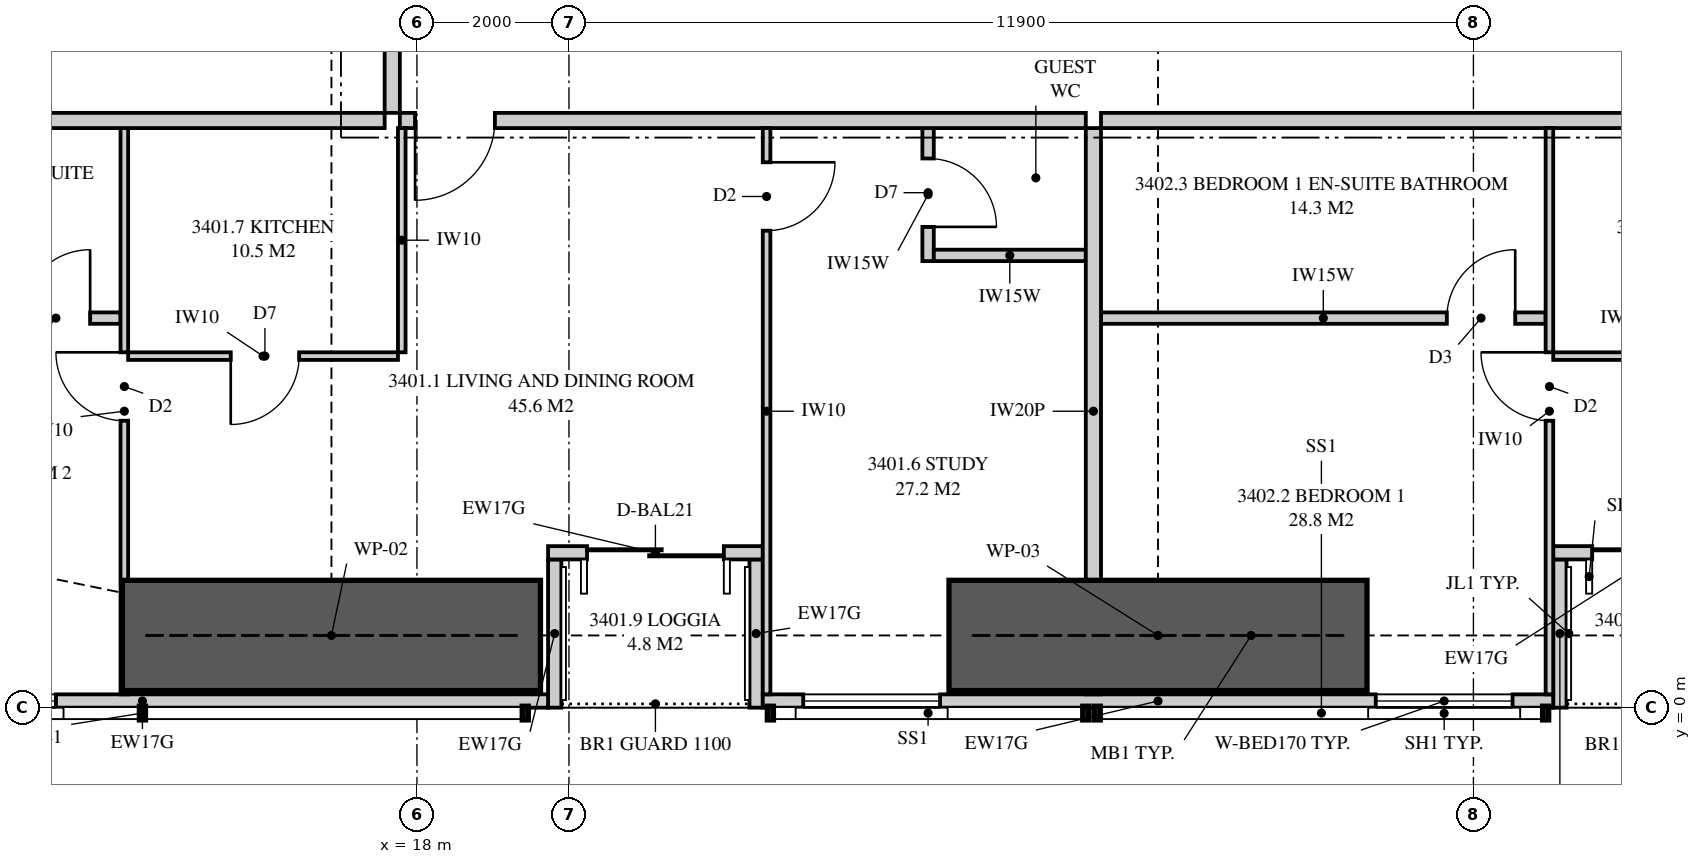
"""IFC4 building model, lengths in metres.
Left out: names, types, materials, properties, quantities, classifications, styles, units other than length and angle.
Written with IfcOpenShell. Run it as: python <this file> out.ifc"""

import sys

from ifc_helpers import new_model, si_unit, direction, frame, frame_2d, origin, place, context, subcontext, project, spatial, polyline, rectangle, outline, extrude, element, fill, save


model = new_model("IFC4")
c1 = context("Model", 3, precision=1e-05, world=origin(), true_north=direction((0.0, 1.0)))
c2 = subcontext(c1, "Body", "Model", "MODEL_VIEW")
j1 = project(units=[si_unit("LENGTHUNIT", "METRE"), si_unit("PLANEANGLEUNIT", "RADIAN")], contexts=[c1])
p1 = place(None, origin())
s1 = spatial("IfcSite", under=j1, at=p1, CompositionType="ELEMENT")
p2 = place(p1, origin())
s2 = spatial("IfcBuilding", under=s1, at=p2, CompositionType="ELEMENT")
p3 = place(p2, frame((0.0, 0.0, 124.95)))
s3 = spatial("IfcBuildingStorey", under=s2, at=p3, CompositionType="ELEMENT", Elevation=124.95)
p4 = place(p3, frame((9.051, 0.087, 0.0), z_axis=(0.0, 0.0, 1.0), x_axis=(1.0, 0.0, 0.0)))
e1 = element("IfcWall", 1, at=p4, inside=s3, PredefinedType="SOLIDWALL", context=c2, shape_type="SweptSolid", body=[
    extrude(outline(polyline([(0.0, 0.0), (10.674, 0.0), (10.674, 2.15), (7.824, 2.15), (7.824, 3.11), (7.666, 3.11), (7.666, 2.15), (7.62, 2.15), (7.62, 3.11), (0.0, 3.11), (0.0, 0.0)])), frame((0.0, 0.087, 0.0), z_axis=(0.0, -1.0, 0.0), x_axis=(1.0, 0.0, 0.0)), (0.0, 0.0, 1.0), 0.175),
])
p5 = place(p4, frame((2.399, 0.0, 0.4)))
e2 = element("IfcOpeningElement", 2, at=p5, cuts=e1, PredefinedType="OPENING", context=c2, shape_type="SweptSolid", body=[
    extrude(rectangle(XDim=1.8, YDim=1.7, at=frame_2d((0.9, 0.85))), frame((0.0, 0.097, 0.0), z_axis=(0.0, -1.0, 0.0), x_axis=(1.0, 0.0, 0.0)), (0.0, 0.0, 1.0), 0.195),
])
p6 = place(p3, frame((22.55, 0.087, 0.0), z_axis=(0.0, 0.0, 1.0), x_axis=(1.0, 0.0, 0.0)))
e3 = element("IfcWall", 3, at=p6, inside=s3, PredefinedType="SOLIDWALL", context=c2, shape_type="SweptSolid", body=[
    extrude(rectangle(XDim=10.4, YDim=0.175, at=frame_2d((5.2, 0.0))), origin(), (0.0, 0.0, 1.0), 2.15),
])
p7 = place(p6, frame((0.532, 0.0, 0.4)))
e4 = element("IfcOpeningElement", 4, at=p7, cuts=e3, PredefinedType="OPENING", context=c2, shape_type="SweptSolid", body=[
    extrude(rectangle(XDim=1.8, YDim=1.7, at=frame_2d((0.9, 0.85))), frame((0.0, 0.097, 0.0), z_axis=(0.0, -1.0, 0.0), x_axis=(1.0, 0.0, 0.0)), (0.0, 0.0, 1.0), 0.195),
])
p8 = place(p6, frame((8.065, 0.0, 0.4)))
e5 = element("IfcOpeningElement", 5, at=p8, cuts=e3, PredefinedType="OPENING", context=c2, shape_type="SweptSolid", body=[
    extrude(rectangle(XDim=1.8, YDim=1.7, at=frame_2d((0.9, 0.85))), frame((0.0, 0.097, 0.0), z_axis=(0.0, -1.0, 0.0), x_axis=(1.0, 0.0, 0.0)), (0.0, 0.0, 1.0), 0.195),
])
p9 = place(p3, frame((19.725, 2.038, 0.0), z_axis=(0.0, 0.0, 1.0), x_axis=(1.0, 0.0, 0.0)))
e6 = element("IfcWall", 6, at=p9, inside=s3, PredefinedType="SOLIDWALL", context=c2, shape_type="SweptSolid", body=[
    extrude(rectangle(XDim=2.825, YDim=0.175, at=frame_2d((1.413, 0.0))), origin(), (0.0, 0.0, 1.0), 3.11),
])
p10 = place(p9, frame((0.512, 0.0, 0.0)))
e7 = element("IfcOpeningElement", 7, at=p10, cuts=e6, PredefinedType="OPENING", context=c2, shape_type="SweptSolid", body=[
    extrude(rectangle(XDim=1.8, YDim=2.1, at=frame_2d((0.9, 1.05))), frame((0.0, 0.097, 0.0), z_axis=(0.0, -1.0, 0.0), x_axis=(1.0, 0.0, 0.0)), (0.0, 0.0, 1.0), 0.195),
])
for number, where, z_axis, x_axis in (
    (8, (19.812, 0.0, 0.0), (0.0, 0.0, 1.0), (0.0, 1.0, 0.0)),
    (9, (22.462, 0.0, 0.0), (0.0, 0.0, 1.0), (0.0, 1.0, 0.0)),
):
    element("IfcWall", number, at=place(p3, frame(where, z_axis=z_axis, x_axis=x_axis)), inside=s3, PredefinedType="SOLIDWALL", context=c2, shape_type="SweptSolid", body=[
        extrude(outline(polyline([(0.0, 0.0), (1.95, 0.0), (1.95, 3.11), (1.75, 3.11), (1.75, 2.15), (0.15, 2.15), (0.15, 3.11), (0.0, 3.11), (0.0, 0.0)])), frame((0.0, 0.087, 0.0), z_axis=(0.0, -1.0, 0.0), x_axis=(1.0, 0.0, 0.0)), (0.0, 0.0, 1.0), 0.175),
    ])
p11 = place(p3, frame((32.95, 2.038, 0.0), z_axis=(0.0, 0.0, 1.0), x_axis=(1.0, 0.0, 0.0)))
e10 = element("IfcWall", 10, at=p11, inside=s3, PredefinedType="SOLIDWALL", context=c2, shape_type="SweptSolid", body=[
    extrude(rectangle(XDim=2.825, YDim=0.175, at=frame_2d((1.413, 0.0))), origin(), (0.0, 0.0, 1.0), 3.11),
])
p12 = place(p11, frame((0.512, 0.0, 0.0)))
e11 = element("IfcOpeningElement", 11, at=p12, cuts=e10, PredefinedType="OPENING", context=c2, shape_type="SweptSolid", body=[
    extrude(rectangle(XDim=1.8, YDim=2.1, at=frame_2d((0.9, 1.05))), frame((0.0, 0.097, 0.0), z_axis=(0.0, -1.0, 0.0), x_axis=(1.0, 0.0, 0.0)), (0.0, 0.0, 1.0), 0.195),
])
p13 = place(p3, frame((33.038, 0.0, 0.0), z_axis=(0.0, 0.0, 1.0), x_axis=(0.0, 1.0, 0.0)))
e12 = element("IfcWall", 12, at=p13, inside=s3, PredefinedType="SOLIDWALL", context=c2, shape_type="SweptSolid", body=[
    extrude(outline(polyline([(0.0, 0.0), (1.95, 0.0), (1.95, 3.11), (1.75, 3.11), (1.75, 2.15), (0.15, 2.15), (0.15, 3.11), (0.0, 3.11), (0.0, 0.0)])), frame((0.0, 0.087, 0.0), z_axis=(0.0, -1.0, 0.0), x_axis=(1.0, 0.0, 0.0)), (0.0, 0.0, 1.0), 0.175),
])
p14 = place(p3, frame((26.9, 0.175, 0.0), z_axis=(0.0, 0.0, 1.0), x_axis=(0.0, 1.0, 0.0)))
e13 = element("IfcWall", 13, at=p14, inside=s3, PredefinedType="PARTITIONING", context=c2, shape_type="SweptSolid", body=[
    extrude(outline(polyline([(0.529, 2.15), (0.0, 2.15), (0.0, 0.0), (0.529, 0.0), (0.529, 0.923), (1.021, 0.923), (1.021, 0.0), (7.45, 0.0), (7.45, 3.11), (1.685, 3.11), (1.685, 2.15), (1.021, 2.15), (1.021, 1.227), (0.529, 1.227), (0.529, 2.15)])), frame((0.0, 0.1, 0.0), z_axis=(0.0, -1.0, 0.0), x_axis=(1.0, 0.0, 0.0)), (0.0, 0.0, 1.0), 0.2),
])
p15 = place(p3, frame((17.775, 7.725, 0.0), z_axis=(0.0, 0.0, 1.0), x_axis=(1.0, 0.0, 0.0)))
e14 = element("IfcWall", 14, at=p15, inside=s3, PredefinedType="PARTITIONING", context=c2, shape_type="SweptSolid", body=[
    extrude(rectangle(XDim=9.025, YDim=0.2, at=frame_2d((4.513, 0.0))), origin(), (0.0, 0.0, 1.0), 3.11),
])
p16 = place(p15, frame((0.2, 0.0, 0.0)))
e15 = element("IfcOpeningElement", 15, at=p16, cuts=e14, PredefinedType="OPENING", context=c2, shape_type="SweptSolid", body=[
    extrude(rectangle(XDim=1.05, YDim=2.2, at=frame_2d((0.525, 1.1))), frame((0.0, 0.11, 0.0), z_axis=(0.0, -1.0, 0.0), x_axis=(1.0, 0.0, 0.0)), (0.0, 0.0, 1.0), 0.22),
])
p17 = place(p3, frame((14.15, 0.175, 0.0), z_axis=(0.0, 0.0, 1.0), x_axis=(0.0, 1.0, 0.0)))
e16 = element("IfcWall", 16, at=p17, inside=s3, PredefinedType="PARTITIONING", context=c2, shape_type="SweptSolid", body=[
    extrude(outline(polyline([(0.0, 0.0), (7.45, 0.0), (7.45, 3.11), (2.208, 3.11), (2.208, 2.15), (0.453, 2.15), (0.453, 3.11), (0.0, 3.11), (0.0, 0.0)])), frame((0.0, 0.05, 0.0), z_axis=(0.0, -1.0, 0.0), x_axis=(1.0, 0.0, 0.0)), (0.0, 0.0, 1.0), 0.1),
])
p18 = place(p17, frame((3.6, 0.0, 0.0)))
e17 = element("IfcOpeningElement", 17, at=p18, cuts=e16, PredefinedType="OPENING", context=c2, shape_type="SweptSolid", body=[
    extrude(rectangle(XDim=0.9, YDim=2.1, at=frame_2d((0.45, 1.05))), frame((0.0, 0.06, 0.0), z_axis=(0.0, -1.0, 0.0), x_axis=(1.0, 0.0, 0.0)), (0.0, 0.0, 1.0), 0.12),
])
p19 = place(p3, frame((10.6, 5.125, 0.0), z_axis=(0.0, 0.0, 1.0), x_axis=(1.0, 0.0, 0.0)))
e18 = element("IfcWall", 18, at=p19, inside=s3, PredefinedType="PLUMBINGWALL", context=c2, shape_type="SweptSolid", body=[
    extrude(outline(polyline([(0.0, 0.0), (3.5, 0.0), (3.5, 3.11), (0.885, 3.11), (0.885, 2.51), (0.0, 2.51), (0.0, 3.11), (0.0, 0.0)])), frame((0.0, 0.075, 0.0), z_axis=(0.0, -1.0, 0.0), x_axis=(1.0, 0.0, 0.0)), (0.0, 0.0, 1.0), 0.15),
])
p20 = place(p19, frame((2.2, 0.0, 0.0)))
e19 = element("IfcOpeningElement", 19, at=p20, cuts=e18, PredefinedType="OPENING", context=c2, shape_type="SweptSolid", body=[
    extrude(rectangle(XDim=0.9, YDim=2.1, at=frame_2d((0.45, 1.05))), frame((0.0, 0.085, 0.0), z_axis=(0.0, -1.0, 0.0), x_axis=(1.0, 0.0, 0.0)), (0.0, 0.0, 1.0), 0.17),
])
p21 = place(p3, frame((22.6, 0.175, 0.0), z_axis=(0.0, 0.0, 1.0), x_axis=(0.0, 1.0, 0.0)))
e20 = element("IfcWall", 20, at=p21, inside=s3, PredefinedType="PARTITIONING", context=c2, shape_type="SweptSolid", body=[
    extrude(outline(polyline([(0.0, 0.0), (7.45, 0.0), (7.45, 3.11), (1.635, 3.11), (1.635, 2.15), (0.0, 2.15), (0.0, 3.11), (0.0, 0.0)])), frame((0.0, 0.05, 0.0), z_axis=(0.0, -1.0, 0.0), x_axis=(1.0, 0.0, 0.0)), (0.0, 0.0, 1.0), 0.1),
])
p22 = place(p21, frame((6.1, 0.0, 0.0)))
e21 = element("IfcOpeningElement", 21, at=p22, cuts=e20, PredefinedType="OPENING", context=c2, shape_type="SweptSolid", body=[
    extrude(rectangle(XDim=0.9, YDim=2.1, at=frame_2d((0.45, 1.05))), frame((0.0, 0.06, 0.0), z_axis=(0.0, -1.0, 0.0), x_axis=(1.0, 0.0, 0.0)), (0.0, 0.0, 1.0), 0.12),
])
p23 = place(p3, frame((14.2, 4.625, 0.0), z_axis=(0.0, 0.0, 1.0), x_axis=(1.0, 0.0, 0.0)))
e22 = element("IfcWall", 22, at=p23, inside=s3, PredefinedType="PARTITIONING", context=c2, shape_type="SweptSolid", body=[
    extrude(outline(polyline([(0.0, 0.0), (3.55, 0.0), (3.55, 3.11), (2.962, 3.11), (2.962, 2.541), (2.388, 2.541), (2.388, 3.11), (0.0, 3.11), (0.0, 0.0)])), frame((0.0, 0.05, 0.0), z_axis=(0.0, -1.0, 0.0), x_axis=(1.0, 0.0, 0.0)), (0.0, 0.0, 1.0), 0.1),
])
p24 = place(p23, frame((1.35, 0.0, 0.0)))
e23 = element("IfcOpeningElement", 23, at=p24, cuts=e22, PredefinedType="OPENING", context=c2, shape_type="SweptSolid", body=[
    extrude(rectangle(XDim=0.9, YDim=2.1, at=frame_2d((0.45, 1.05))), frame((0.0, 0.06, 0.0), z_axis=(0.0, -1.0, 0.0), x_axis=(1.0, 0.0, 0.0)), (0.0, 0.0, 1.0), 0.12),
])
p25 = place(p3, frame((17.8, 4.675, 0.0), z_axis=(0.0, 0.0, 1.0), x_axis=(0.0, 1.0, 0.0)))
e24 = element("IfcWall", 24, at=p25, inside=s3, PredefinedType="PARTITIONING", context=c2, shape_type="SweptSolid", body=[
    extrude(rectangle(XDim=2.95, YDim=0.1, at=frame_2d((1.475, 0.0))), origin(), (0.0, 0.0, 1.0), 3.11),
])
p26 = place(p3, frame((27.0, 7.725, 0.0), z_axis=(0.0, 0.0, 1.0), x_axis=(1.0, 0.0, 0.0)))
e25 = element("IfcWall", 25, at=p26, inside=s3, PredefinedType="PARTITIONING", context=c2, shape_type="SweptSolid", body=[
    extrude(outline(polyline([(0.0, 0.0), (9.8, 0.0), (9.8, 3.11), (1.087, 3.11), (1.087, 2.541), (0.413, 2.541), (0.413, 3.11), (0.0, 3.11), (0.0, 0.0)])), frame((0.0, 0.1, 0.0), z_axis=(0.0, -1.0, 0.0), x_axis=(1.0, 0.0, 0.0)), (0.0, 0.0, 1.0), 0.2),
])
p27 = place(p3, frame((32.9, 0.175, 0.0), z_axis=(0.0, 0.0, 1.0), x_axis=(0.0, 1.0, 0.0)))
e26 = element("IfcWall", 26, at=p27, inside=s3, PredefinedType="PARTITIONING", context=c2, shape_type="SweptSolid", body=[
    extrude(outline(polyline([(0.0, 0.0), (7.45, 0.0), (7.45, 3.11), (1.635, 3.11), (1.635, 2.15), (0.0, 2.15), (0.0, 3.11), (0.0, 0.0)])), frame((0.0, 0.05, 0.0), z_axis=(0.0, -1.0, 0.0), x_axis=(1.0, 0.0, 0.0)), (0.0, 0.0, 1.0), 0.1),
])
p28 = place(p27, frame((3.6, 0.0, 0.0)))
e27 = element("IfcOpeningElement", 27, at=p28, cuts=e26, PredefinedType="OPENING", context=c2, shape_type="SweptSolid", body=[
    extrude(rectangle(XDim=0.9, YDim=2.1, at=frame_2d((0.45, 1.05))), frame((0.0, 0.06, 0.0), z_axis=(0.0, -1.0, 0.0), x_axis=(1.0, 0.0, 0.0)), (0.0, 0.0, 1.0), 0.12),
])
p29 = place(p3, frame((27.0, 5.125, 0.0), z_axis=(0.0, 0.0, 1.0), x_axis=(1.0, 0.0, 0.0)))
e28 = element("IfcWall", 28, at=p29, inside=s3, PredefinedType="PLUMBINGWALL", context=c2, shape_type="SweptSolid", body=[
    extrude(outline(polyline([(0.0, 0.0), (5.85, 0.0), (5.85, 3.11), (1.062, 3.11), (1.062, 2.541), (0.438, 2.541), (0.438, 3.11), (0.0, 3.11), (0.0, 0.0)])), frame((0.0, 0.075, 0.0), z_axis=(0.0, -1.0, 0.0), x_axis=(1.0, 0.0, 0.0)), (0.0, 0.0, 1.0), 0.15),
])
p30 = place(p29, frame((4.55, 0.0, 0.0)))
e29 = element("IfcOpeningElement", 29, at=p30, cuts=e28, PredefinedType="OPENING", context=c2, shape_type="SweptSolid", body=[
    extrude(rectangle(XDim=0.9, YDim=2.1, at=frame_2d((0.45, 1.05))), frame((0.0, 0.085, 0.0), z_axis=(0.0, -1.0, 0.0), x_axis=(1.0, 0.0, 0.0)), (0.0, 0.0, 1.0), 0.17),
])
p31 = place(p3, frame((32.95, 4.625, 0.0), z_axis=(0.0, 0.0, 1.0), x_axis=(1.0, 0.0, 0.0)))
e30 = element("IfcWall", 30, at=p31, inside=s3, PredefinedType="PARTITIONING", context=c2, shape_type="SweptSolid", body=[
    extrude(rectangle(XDim=3.55, YDim=0.1, at=frame_2d((1.775, 0.0))), origin(), (0.0, 0.0, 1.0), 3.11),
])
p32 = place(p31, frame((1.35, 0.0, 0.0)))
e31 = element("IfcOpeningElement", 31, at=p32, cuts=e30, PredefinedType="OPENING", context=c2, shape_type="SweptSolid", body=[
    extrude(rectangle(XDim=0.9, YDim=2.1, at=frame_2d((0.45, 1.05))), frame((0.0, 0.06, 0.0), z_axis=(0.0, -1.0, 0.0), x_axis=(1.0, 0.0, 0.0)), (0.0, 0.0, 1.0), 0.12),
])
p33 = place(p3, frame((6.0, 7.725, 0.0), z_axis=(0.0, 0.0, 1.0), x_axis=(1.0, 0.0, 0.0)))
e32 = element("IfcWall", 32, at=p33, inside=s3, PredefinedType="PARTITIONING", context=c2, shape_type="SweptSolid", body=[
    extrude(outline(polyline([(0.0, 0.0), (11.575, 0.0), (11.575, 3.11), (11.212, 3.11), (11.212, 2.541), (10.538, 2.541), (10.538, 3.11), (5.51, 3.11), (5.51, 2.51), (2.969, 2.51), (2.969, 2.541), (2.727, 2.541), (2.727, 2.15), (0.884, 2.15), (0.884, 3.11), (0.0, 3.11), (0.0, 0.0)])), frame((0.0, 0.1, 0.0), z_axis=(0.0, -1.0, 0.0), x_axis=(1.0, 0.0, 0.0)), (0.0, 0.0, 1.0), 0.2),
])
p34 = place(p3, frame((17.675, 7.825, 0.0), z_axis=(0.0, 0.0, 1.0), x_axis=(0.0, 1.0, 0.0)))
e33 = element("IfcWall", 33, at=p34, inside=s3, PredefinedType="PARTITIONING", context=c2, shape_type="SweptSolid", body=[
    extrude(rectangle(XDim=1.413, YDim=0.2, at=frame_2d((0.706, 0.0))), origin(), (0.0, 0.0, 1.0), 3.11),
])
p35 = place(p3, frame((24.725, 7.625, 0.0), z_axis=(0.0, 0.0, 1.0), x_axis=(0.0, -1.0, 0.0)))
e34 = element("IfcWall", 34, at=p35, inside=s3, PredefinedType="PLUMBINGWALL", context=c2, shape_type="SweptSolid", body=[
    extrude(rectangle(XDim=1.75, YDim=0.15, at=frame_2d((0.875, 0.0))), origin(), (0.0, 0.0, 1.0), 3.11),
])
p36 = place(p35, frame((0.4, 0.0, 0.0)))
e35 = element("IfcOpeningElement", 35, at=p36, cuts=e34, PredefinedType="OPENING", context=c2, shape_type="SweptSolid", body=[
    extrude(rectangle(XDim=0.9, YDim=2.1, at=frame_2d((0.45, 1.05))), frame((0.0, 0.085, 0.0), z_axis=(0.0, -1.0, 0.0), x_axis=(1.0, 0.0, 0.0)), (0.0, 0.0, 1.0), 0.17),
])
p37 = place(p3, frame((26.8, 5.95, 0.0), z_axis=(0.0, 0.0, 1.0), x_axis=(-1.0, 0.0, 0.0)))
e36 = element("IfcWall", 36, at=p37, inside=s3, PredefinedType="PLUMBINGWALL", context=c2, shape_type="SweptSolid", body=[
    extrude(rectangle(XDim=2.0, YDim=0.15, at=frame_2d((1.0, 0.0))), origin(), (0.0, 0.0, 1.0), 3.11),
])
for number, where, z_axis, x_axis in (
    (37, (14.125, 0.95, 0.0), (0.0, 0.0, 1.0), (1.0, 0.0, 0.0)),
    (38, (25.0, 0.95, 0.0), (0.0, 0.0, 1.0), (1.0, 0.0, 0.0)),
):
    element("IfcWall", number, at=place(p3, frame(where, z_axis=z_axis, x_axis=x_axis)), inside=s3, PredefinedType="SHEAR", context=c2, shape_type="SweptSolid", body=[
        extrude(rectangle(XDim=5.5, YDim=1.45, at=frame_2d((2.75, 0.0))), origin(), (0.0, 0.0, 1.0), 3.35),
    ])
p38 = place(p5, origin())
e39 = element("IfcWindow", 39, at=p38, inside=s3, PartitioningType="SINGLE_PANEL", PredefinedType="WINDOW", context=c2, shape_type="SweptSolid", body=[
    extrude(rectangle(XDim=1.8, YDim=1.7, at=frame_2d((0.9, 0.85))), frame((0.0, 0.03, 0.0), z_axis=(0.0, -1.0, 0.0), x_axis=(1.0, 0.0, 0.0)), (0.0, 0.0, 1.0), 0.06),
])
fill(e2, e39)
p39 = place(p10, origin())
e40 = element("IfcDoor", 40, at=p39, inside=s3, OperationType="SLIDING_TO_LEFT", PredefinedType="DOOR", context=c2, shape_type="SweptSolid", body=[
    extrude(rectangle(XDim=1.8, YDim=2.1, at=frame_2d((0.9, 1.05))), frame((0.0, 0.025, 0.0), z_axis=(0.0, -1.0, 0.0), x_axis=(1.0, 0.0, 0.0)), (0.0, 0.0, 1.0), 0.05),
])
fill(e7, e40)
p40 = place(p7, origin())
e41 = element("IfcWindow", 41, at=p40, inside=s3, PartitioningType="SINGLE_PANEL", PredefinedType="WINDOW", context=c2, shape_type="SweptSolid", body=[
    extrude(rectangle(XDim=1.8, YDim=1.7, at=frame_2d((0.9, 0.85))), frame((0.0, 0.03, 0.0), z_axis=(0.0, -1.0, 0.0), x_axis=(1.0, 0.0, 0.0)), (0.0, 0.0, 1.0), 0.06),
])
fill(e4, e41)
p41 = place(p8, origin())
e42 = element("IfcWindow", 42, at=p41, inside=s3, PartitioningType="SINGLE_PANEL", PredefinedType="WINDOW", context=c2, shape_type="SweptSolid", body=[
    extrude(rectangle(XDim=1.8, YDim=1.7, at=frame_2d((0.9, 0.85))), frame((0.0, 0.03, 0.0), z_axis=(0.0, -1.0, 0.0), x_axis=(1.0, 0.0, 0.0)), (0.0, 0.0, 1.0), 0.06),
])
fill(e5, e42)
p42 = place(p12, origin())
e43 = element("IfcDoor", 43, at=p42, inside=s3, OperationType="SLIDING_TO_LEFT", PredefinedType="DOOR", context=c2, shape_type="SweptSolid", body=[
    extrude(rectangle(XDim=1.8, YDim=2.1, at=frame_2d((0.9, 1.05))), frame((0.0, 0.025, 0.0), z_axis=(0.0, -1.0, 0.0), x_axis=(1.0, 0.0, 0.0)), (0.0, 0.0, 1.0), 0.05),
])
fill(e11, e43)
p43 = place(p16, frame((1.05, 0.0, 0.0), z_axis=(0.0, 0.0, 1.0), x_axis=(-1.0, 0.0, 0.0)))
e44 = element("IfcDoor", 44, at=p43, inside=s3, OperationType="SINGLE_SWING_RIGHT", PredefinedType="DOOR", context=c2, shape_type="SweptSolid", body=[
    extrude(rectangle(XDim=1.05, YDim=2.2, at=frame_2d((0.525, 1.1))), frame((0.0, 0.025, 0.0), z_axis=(0.0, -1.0, 0.0), x_axis=(1.0, 0.0, 0.0)), (0.0, 0.0, 1.0), 0.05),
])
fill(e15, e44)
p44 = place(p18, origin())
e45 = element("IfcDoor", 45, at=p44, inside=s3, OperationType="SINGLE_SWING_RIGHT", PredefinedType="DOOR", context=c2, shape_type="SweptSolid", body=[
    extrude(rectangle(XDim=0.9, YDim=2.1, at=frame_2d((0.45, 1.05))), frame((0.0, 0.025, 0.0), z_axis=(0.0, -1.0, 0.0), x_axis=(1.0, 0.0, 0.0)), (0.0, 0.0, 1.0), 0.05),
])
fill(e17, e45)
p45 = place(p20, origin())
e46 = element("IfcDoor", 46, at=p45, inside=s3, OperationType="SINGLE_SWING_RIGHT", PredefinedType="DOOR", context=c2, shape_type="SweptSolid", body=[
    extrude(rectangle(XDim=0.9, YDim=2.1, at=frame_2d((0.45, 1.05))), frame((0.0, 0.025, 0.0), z_axis=(0.0, -1.0, 0.0), x_axis=(1.0, 0.0, 0.0)), (0.0, 0.0, 1.0), 0.05),
])
fill(e19, e46)
p46 = place(p22, frame((0.9, 0.0, 0.0), z_axis=(0.0, 0.0, 1.0), x_axis=(-1.0, 0.0, 0.0)))
e47 = element("IfcDoor", 47, at=p46, inside=s3, OperationType="SINGLE_SWING_LEFT", PredefinedType="DOOR", context=c2, shape_type="SweptSolid", body=[
    extrude(rectangle(XDim=0.9, YDim=2.1, at=frame_2d((0.45, 1.05))), frame((0.0, 0.025, 0.0), z_axis=(0.0, -1.0, 0.0), x_axis=(1.0, 0.0, 0.0)), (0.0, 0.0, 1.0), 0.05),
])
fill(e21, e47)
p47 = place(p24, frame((0.9, 0.0, 0.0), z_axis=(0.0, 0.0, 1.0), x_axis=(-1.0, 0.0, 0.0)))
e48 = element("IfcDoor", 48, at=p47, inside=s3, OperationType="SINGLE_SWING_RIGHT", PredefinedType="DOOR", context=c2, shape_type="SweptSolid", body=[
    extrude(rectangle(XDim=0.9, YDim=2.1, at=frame_2d((0.45, 1.05))), frame((0.0, 0.025, 0.0), z_axis=(0.0, -1.0, 0.0), x_axis=(1.0, 0.0, 0.0)), (0.0, 0.0, 1.0), 0.05),
])
fill(e23, e48)
p48 = place(p28, origin())
e49 = element("IfcDoor", 49, at=p48, inside=s3, OperationType="SINGLE_SWING_RIGHT", PredefinedType="DOOR", context=c2, shape_type="SweptSolid", body=[
    extrude(rectangle(XDim=0.9, YDim=2.1, at=frame_2d((0.45, 1.05))), frame((0.0, 0.025, 0.0), z_axis=(0.0, -1.0, 0.0), x_axis=(1.0, 0.0, 0.0)), (0.0, 0.0, 1.0), 0.05),
])
fill(e27, e49)
p49 = place(p30, origin())
e50 = element("IfcDoor", 50, at=p49, inside=s3, OperationType="SINGLE_SWING_RIGHT", PredefinedType="DOOR", context=c2, shape_type="SweptSolid", body=[
    extrude(rectangle(XDim=0.9, YDim=2.1, at=frame_2d((0.45, 1.05))), frame((0.0, 0.025, 0.0), z_axis=(0.0, -1.0, 0.0), x_axis=(1.0, 0.0, 0.0)), (0.0, 0.0, 1.0), 0.05),
])
fill(e29, e50)
p50 = place(p36, origin())
e51 = element("IfcDoor", 51, at=p50, inside=s3, OperationType="SINGLE_SWING_RIGHT", PredefinedType="DOOR", context=c2, shape_type="SweptSolid", body=[
    extrude(rectangle(XDim=0.9, YDim=2.1, at=frame_2d((0.45, 1.05))), frame((0.0, 0.025, 0.0), z_axis=(0.0, -1.0, 0.0), x_axis=(1.0, 0.0, 0.0)), (0.0, 0.0, 1.0), 0.05),
])
fill(e35, e51)
save(model, sys.argv[1])
